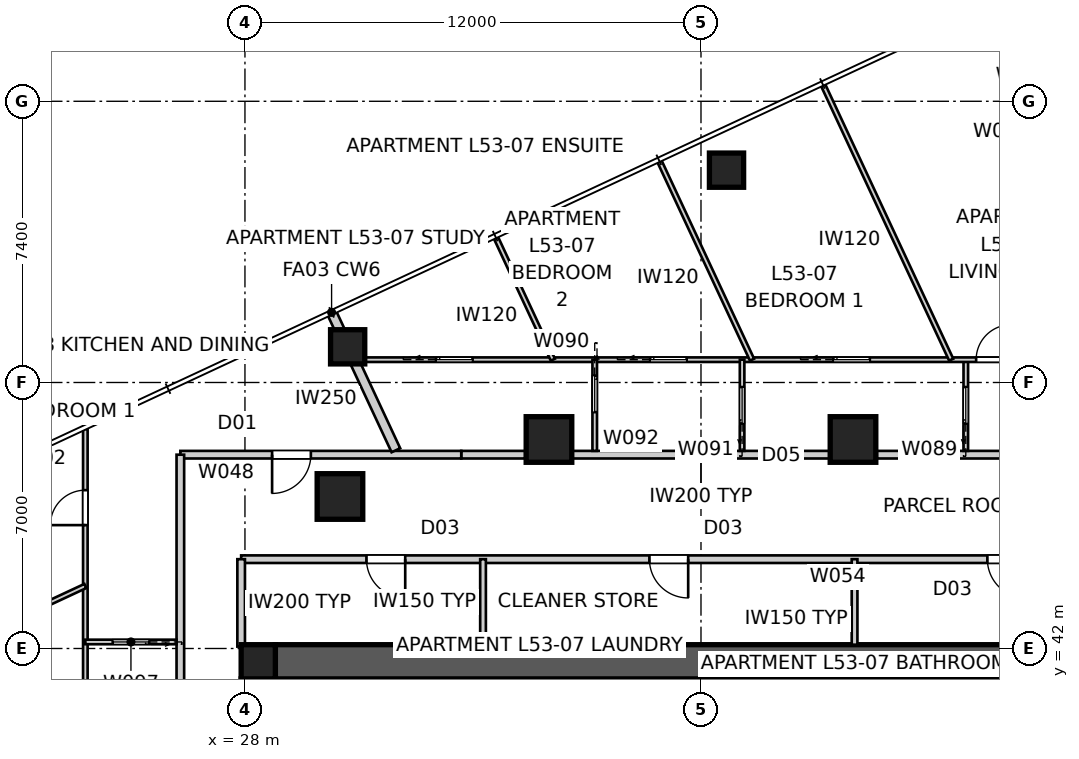
"""IFC4 building model, lengths in metres.
Left out: names, types, materials, properties, quantities, classifications, styles, units other than length and angle.
Written with IfcOpenShell. Run it as: python <this file> out.ifc"""

import sys

from ifc_helpers import new_model, si_unit, direction, frame, frame_2d, origin, origin_2d, place, context, subcontext, project, spatial, polyline, rectangle, outline, extrude, element, fill, save


model = new_model("IFC4")
c1 = context("Model", 3, precision=1e-05, world=origin(), true_north=direction((0.0, 1.0)))
c2 = subcontext(c1, "Body", "Model", "MODEL_VIEW")
j1 = project(units=[si_unit("LENGTHUNIT", "METRE"), si_unit("PLANEANGLEUNIT", "RADIAN")], contexts=[c1])
p1 = place(None, origin())
s1 = spatial("IfcSite", under=j1, at=p1, CompositionType="ELEMENT")
p2 = place(p1, origin())
s2 = spatial("IfcBuilding", under=s1, at=p2, CompositionType="ELEMENT")
p3 = place(p2, frame((0.0, 0.0, 193.0)))
s3 = spatial("IfcBuildingStorey", under=s2, at=p3, CompositionType="ELEMENT", Elevation=193.0)
p4 = place(p3, frame((28.8, 41.65, 0.0), z_axis=(0.0, 0.0, 1.0), x_axis=(1.0, 0.0, 0.0)))
e1 = element("IfcWall", 1, at=p4, inside=s3, PredefinedType="SHEAR", context=c2, shape_type="SweptSolid", body=[
    extrude(outline(polyline([(0.0, -0.45), (22.4, -0.45), (22.4, -0.025), (22.85, -0.025), (22.85, 0.025), (22.4, 0.025), (22.4, 0.45), (0.0, 0.45), (0.0, 0.025), (-0.45, 0.025), (-0.45, -0.025), (0.0, -0.025), (0.0, -0.45)])), origin(), (0.0, 0.0, 1.0), 3.4),
])
p5 = place(p3, frame((28.35, 41.2, 0.0), z_axis=(0.0, 0.0, 1.0), x_axis=(0.0, -1.0, 0.0)))
e2 = element("IfcWall", 2, at=p5, inside=s3, PredefinedType="SHEAR", context=c2, shape_type="SweptSolid", body=[
    extrude(outline(polyline([(0.0, -0.45), (22.4, -0.45), (22.4, -0.025), (22.85, -0.025), (22.85, 0.025), (22.4, 0.025), (22.4, 0.45), (0.0, 0.45), (0.0, 0.025), (-0.45, 0.025), (-0.45, -0.025), (0.0, -0.025), (0.0, -0.45)])), origin(), (0.0, 0.0, 1.0), 3.4),
])
p6 = place(p5, frame((11.14, 0.0, 0.0)))
e3 = element("IfcOpeningElement", 3, at=p6, cuts=e2, PredefinedType="OPENING", context=c2, shape_type="SweptSolid", body=[
    extrude(rectangle(XDim=1.02, YDim=2.4, at=frame_2d((0.51, 1.2))), frame((0.0, 0.46, 0.0), z_axis=(0.0, -1.0, 0.0), x_axis=(1.0, 0.0, 0.0)), (0.0, 0.0, 1.0), 0.92),
])
for number, where, z_axis, x_axis in (
    (4, (28.35, 41.65, 0.0), (0.0, 0.0, 1.0), (1.0, 0.0, 0.0)),
    (5, (40.672, 54.588, 0.0), (0.0, 0.0, 1.0), (1.0, 0.0, 0.0)),
    (6, (30.702, 49.939, 0.0), (0.0, 0.0, 1.0), (1.0, 0.0, 0.0)),
):
    element("IfcColumn", number, at=place(p3, frame(where, z_axis=z_axis, x_axis=x_axis)), inside=s3, PredefinedType="COLUMN", context=c2, shape_type="SweptSolid", body=[
        extrude(rectangle(XDim=0.9, YDim=0.9, at=origin_2d()), origin(), (0.0, 0.0, 1.0), 3.4),
    ])
for number, where, z_axis, x_axis in (
    (7, (44.0, 47.5, 0.0), (0.0, 0.0, 1.0), (1.0, 0.0, 0.0)),
    (8, (36.0, 47.5, 0.0), (0.0, 0.0, 1.0), (1.0, 0.0, 0.0)),
    (9, (30.5, 46.0, 0.0), (0.0, 0.0, 1.0), (1.0, 0.0, 0.0)),
):
    element("IfcColumn", number, at=place(p3, frame(where, z_axis=z_axis, x_axis=x_axis)), inside=s3, PredefinedType="COLUMN", context=c2, shape_type="SweptSolid", body=[
        extrude(rectangle(XDim=1.2, YDim=1.2, at=origin_2d()), origin(), (0.0, 0.0, 1.0), 3.4),
    ])
p7 = place(p3, frame((49.19, 55.25, 0.0), z_axis=(0.0, 0.0, 1.0), x_axis=(-0.422658246362, 0.906289140828, 0.0)))
e10 = element("IfcWall", 10, at=p7, inside=s3, PredefinedType="SOLIDWALL", context=c2, shape_type="SweptSolid", body=[
    extrude(rectangle(XDim=4.0, YDim=0.2, at=frame_2d((2.0, 0.0))), origin(), (0.0, 0.0, 1.0), 3.25),
])
p8 = place(p7, frame((1.0, 0.0, 0.45)))
e11 = element("IfcOpeningElement", 11, at=p8, cuts=e10, PredefinedType="OPENING", context=c2, shape_type="SweptSolid", body=[
    extrude(rectangle(XDim=2.0, YDim=1.8, at=frame_2d((1.0, 0.9))), frame((0.0, 0.11, 0.0), z_axis=(0.0, -1.0, 0.0), x_axis=(1.0, 0.0, 0.0)), (0.0, 0.0, 1.0), 0.22),
])
p9 = place(p3, frame((53.7, 47.1, 0.0), z_axis=(0.0, 0.0, 1.0), x_axis=(-1.0, 0.0, 0.0)))
e12 = element("IfcWall", 12, at=p9, inside=s3, PredefinedType="PARTITIONING", context=c2, shape_type="SweptSolid", body=[
    extrude(rectangle(XDim=7.392, YDim=0.2, at=frame_2d((3.696, 0.0))), origin(), (0.0, 0.0, 1.0), 3.25),
])
p10 = place(p9, frame((2.431, 0.0, 0.0)))
e13 = element("IfcOpeningElement", 13, at=p10, cuts=e12, PredefinedType="OPENING", context=c2, shape_type="SweptSolid", body=[
    extrude(rectangle(XDim=1.02, YDim=2.34, at=frame_2d((0.51, 1.17))), frame((0.0, 0.11, 0.0), z_axis=(0.0, -1.0, 0.0), x_axis=(1.0, 0.0, 0.0)), (0.0, 0.0, 1.0), 0.22),
])
p11 = place(p3, frame((46.308, 47.1, 0.0), z_axis=(0.0, 0.0, 1.0), x_axis=(-1.0, 0.0, 0.0)))
e14 = element("IfcWall", 14, at=p11, inside=s3, PredefinedType="PARTITIONING", context=c2, shape_type="SweptSolid", body=[
    extrude(rectangle(XDim=1.683, YDim=0.2, at=frame_2d((0.842, 0.0))), origin(), (0.0, 0.0, 1.0), 2.55),
])
p12 = place(p3, frame((44.625, 47.1, 0.0), z_axis=(0.0, 0.0, 1.0), x_axis=(-1.0, 0.0, 0.0)))
e15 = element("IfcWall", 15, at=p12, inside=s3, PredefinedType="PARTITIONING", context=c2, shape_type="SweptSolid", body=[
    extrude(rectangle(XDim=9.25, YDim=0.2, at=frame_2d((4.625, 0.0))), origin(), (0.0, 0.0, 1.0), 3.25),
])
p13 = place(p3, frame((35.375, 47.1, 0.0), z_axis=(0.0, 0.0, 1.0), x_axis=(-1.0, 0.0, 0.0)))
e16 = element("IfcWall", 16, at=p13, inside=s3, PredefinedType="PARTITIONING", context=c2, shape_type="SweptSolid", body=[
    extrude(rectangle(XDim=1.683, YDim=0.2, at=frame_2d((0.842, 0.0))), origin(), (0.0, 0.0, 1.0), 2.55),
])
p14 = place(p3, frame((33.692, 47.1, 0.0), z_axis=(0.0, 0.0, 1.0), x_axis=(-1.0, 0.0, 0.0)))
e17 = element("IfcWall", 17, at=p14, inside=s3, PredefinedType="PARTITIONING", context=c2, shape_type="SweptSolid", body=[
    extrude(rectangle(XDim=7.392, YDim=0.2, at=frame_2d((3.696, 0.0))), origin(), (0.0, 0.0, 1.0), 3.25),
])
p15 = place(p14, frame((3.957, 0.0, 0.0)))
e18 = element("IfcOpeningElement", 18, at=p15, cuts=e17, PredefinedType="OPENING", context=c2, shape_type="SweptSolid", body=[
    extrude(rectangle(XDim=1.02, YDim=2.34, at=frame_2d((0.51, 1.17))), frame((0.0, 0.11, 0.0), z_axis=(0.0, -1.0, 0.0), x_axis=(1.0, 0.0, 0.0)), (0.0, 0.0, 1.0), 0.22),
])
p16 = place(p3, frame((26.3, 47.1, 0.0), z_axis=(0.0, 0.0, 1.0), x_axis=(0.0, -1.0, 0.0)))
e19 = element("IfcWall", 19, at=p16, inside=s3, PredefinedType="PARTITIONING", context=c2, shape_type="SweptSolid", body=[
    extrude(rectangle(XDim=33.8, YDim=0.2, at=frame_2d((16.9, 0.0))), origin(), (0.0, 0.0, 1.0), 3.25),
])
p17 = place(p16, frame((15.449, 0.0, 0.0)))
e20 = element("IfcOpeningElement", 20, at=p17, cuts=e19, PredefinedType="OPENING", context=c2, shape_type="SweptSolid", body=[
    extrude(rectangle(XDim=1.02, YDim=2.34, at=frame_2d((0.51, 1.17))), frame((0.0, 0.11, 0.0), z_axis=(0.0, -1.0, 0.0), x_axis=(1.0, 0.0, 0.0)), (0.0, 0.0, 1.0), 0.22),
])
p18 = place(p16, frame((30.883, 0.0, 0.0)))
e21 = element("IfcOpeningElement", 21, at=p18, cuts=e19, PredefinedType="OPENING", context=c2, shape_type="SweptSolid", body=[
    extrude(rectangle(XDim=1.02, YDim=2.34, at=frame_2d((0.51, 1.17))), frame((0.0, 0.11, 0.0), z_axis=(0.0, -1.0, 0.0), x_axis=(1.0, 0.0, 0.0)), (0.0, 0.0, 1.0), 0.22),
])
p19 = place(p3, frame((30.28, 50.845, 0.0), z_axis=(0.0, 0.0, 1.0), x_axis=(0.422605017068, -0.906313963011, 0.0)))
e22 = element("IfcWall", 22, at=p19, inside=s3, PredefinedType="PARTITIONING", context=c2, shape_type="SweptSolid", body=[
    extrude(rectangle(XDim=4.003, YDim=0.25, at=frame_2d((2.002, 0.0))), origin(), (0.0, 0.0, 1.0), 3.25),
])
p20 = place(p3, frame((52.1, 44.35, 0.0), z_axis=(0.0, 0.0, 1.0), x_axis=(-1.0, 0.0, 0.0)))
e23 = element("IfcWall", 23, at=p20, inside=s3, PredefinedType="PARTITIONING", context=c2, shape_type="SweptSolid", body=[
    extrude(rectangle(XDim=24.2, YDim=0.2, at=frame_2d((12.1, 0.0))), origin(), (0.0, 0.0, 1.0), 3.25),
])
p21 = place(p20, frame((12.437, 0.0, 0.0)))
e24 = element("IfcOpeningElement", 24, at=p21, cuts=e23, PredefinedType="OPENING", context=c2, shape_type="SweptSolid", body=[
    extrude(rectangle(XDim=1.02, YDim=2.1, at=frame_2d((0.51, 1.05))), frame((0.0, 0.11, 0.0), z_axis=(0.0, -1.0, 0.0), x_axis=(1.0, 0.0, 0.0)), (0.0, 0.0, 1.0), 0.22),
])
p22 = place(p20, frame((3.544, 0.0, 0.0)))
e25 = element("IfcOpeningElement", 25, at=p22, cuts=e23, PredefinedType="OPENING", context=c2, shape_type="SweptSolid", body=[
    extrude(rectangle(XDim=1.02, YDim=2.1, at=frame_2d((0.51, 1.05))), frame((0.0, 0.11, 0.0), z_axis=(0.0, -1.0, 0.0), x_axis=(1.0, 0.0, 0.0)), (0.0, 0.0, 1.0), 0.22),
])
p23 = place(p20, frame((19.883, 0.0, 0.0)))
e26 = element("IfcOpeningElement", 26, at=p23, cuts=e23, PredefinedType="OPENING", context=c2, shape_type="SweptSolid", body=[
    extrude(rectangle(XDim=1.02, YDim=2.1, at=frame_2d((0.51, 1.05))), frame((0.0, 0.11, 0.0), z_axis=(0.0, -1.0, 0.0), x_axis=(1.0, 0.0, 0.0)), (0.0, 0.0, 1.0), 0.22),
])
p24 = place(p3, frame((27.9, 44.35, 0.0), z_axis=(0.0, 0.0, 1.0), x_axis=(0.0, -1.0, 0.0)))
e27 = element("IfcWall", 27, at=p24, inside=s3, PredefinedType="PARTITIONING", context=c2, shape_type="SweptSolid", body=[
    extrude(rectangle(XDim=2.3, YDim=0.2, at=frame_2d((1.15, 0.0))), origin(), (0.0, 0.0, 1.0), 3.25),
])
p25 = place(p3, frame((34.265, 42.1, 0.0), z_axis=(0.0, 0.0, 1.0), x_axis=(0.0, 1.0, 0.0)))
e28 = element("IfcWall", 28, at=p25, inside=s3, PredefinedType="SOLIDWALL", context=c2, shape_type="SweptSolid", body=[
    extrude(rectangle(XDim=2.25, YDim=0.15, at=frame_2d((1.125, 0.0))), origin(), (0.0, 0.0, 1.0), 2.796),
])
p26 = place(p3, frame((44.042, 42.1, 0.0), z_axis=(0.0, 0.0, 1.0), x_axis=(0.0, 1.0, 0.0)))
e29 = element("IfcWall", 29, at=p26, inside=s3, PredefinedType="SOLIDWALL", context=c2, shape_type="SweptSolid", body=[
    extrude(rectangle(XDim=2.25, YDim=0.15, at=frame_2d((1.125, 0.0))), origin(), (0.0, 0.0, 1.0), 3.25),
])
p27 = place(p3, frame((23.8, 17.205, 0.0), z_axis=(0.0, 0.0, 1.0), x_axis=(0.0, 1.0, 0.0)))
e30 = element("IfcWall", 30, at=p27, inside=s3, PredefinedType="PARTITIONING", context=c2, shape_type="SweptSolid", body=[
    extrude(rectangle(XDim=30.574, YDim=0.12, at=frame_2d((15.287, 0.0))), origin(), (0.0, 0.0, 1.0), 2.55),
])
p28 = place(p27, frame((12.857, 0.0, 0.0)))
e31 = element("IfcOpeningElement", 31, at=p28, cuts=e30, PredefinedType="OPENING", context=c2, shape_type="SweptSolid", body=[
    extrude(rectangle(XDim=0.92, YDim=2.34, at=frame_2d((0.46, 1.17))), frame((0.0, 0.07, 0.0), z_axis=(0.0, -1.0, 0.0), x_axis=(1.0, 0.0, 0.0)), (0.0, 0.0, 1.0), 0.14),
])
p29 = place(p27, frame((28.042, 0.0, 0.0)))
e32 = element("IfcOpeningElement", 32, at=p29, cuts=e30, PredefinedType="OPENING", context=c2, shape_type="SweptSolid", body=[
    extrude(rectangle(XDim=0.92, YDim=2.34, at=frame_2d((0.46, 1.17))), frame((0.0, 0.07, 0.0), z_axis=(0.0, -1.0, 0.0), x_axis=(1.0, 0.0, 0.0)), (0.0, 0.0, 1.0), 0.14),
])
p30 = place(p27, frame((20.655, 0.0, 0.0)))
e33 = element("IfcOpeningElement", 33, at=p30, cuts=e30, PredefinedType="OPENING", context=c2, shape_type="SweptSolid", body=[
    extrude(rectangle(XDim=0.96, YDim=2.1, at=frame_2d((0.48, 1.05))), frame((0.0, 0.07, 0.0), z_axis=(0.0, -1.0, 0.0), x_axis=(1.0, 0.0, 0.0)), (0.0, 0.0, 1.0), 0.14),
])
p31 = place(p3, frame((46.968, 47.2, 0.0), z_axis=(0.0, 0.0, 1.0), x_axis=(0.0, 1.0, 0.0)))
e34 = element("IfcWall", 34, at=p31, inside=s3, PredefinedType="PARTITIONING", context=c2, shape_type="SweptSolid", body=[
    extrude(rectangle(XDim=2.4, YDim=0.12, at=frame_2d((1.2, 0.0))), origin(), (0.0, 0.0, 1.0), 3.25),
])
p32 = place(p31, frame((0.72, 0.0, 0.0)))
e35 = element("IfcOpeningElement", 35, at=p32, cuts=e34, PredefinedType="OPENING", context=c2, shape_type="SweptSolid", body=[
    extrude(rectangle(XDim=0.96, YDim=2.1, at=frame_2d((0.48, 1.05))), frame((0.0, 0.07, 0.0), z_axis=(0.0, -1.0, 0.0), x_axis=(1.0, 0.0, 0.0)), (0.0, 0.0, 1.0), 0.14),
])
p33 = place(p3, frame((30.86, 49.6, 0.0), z_axis=(0.0, 0.0, 1.0), x_axis=(1.0, 0.0, 0.0)))
e36 = element("IfcWall", 36, at=p33, inside=s3, PredefinedType="PARTITIONING", context=c2, shape_type="SweptSolid", body=[
    extrude(rectangle(XDim=25.333, YDim=0.12, at=frame_2d((12.667, 0.0))), origin(), (0.0, 0.0, 1.0), 3.25),
])
p34 = place(p33, frame((20.877, 0.0, 0.0)))
e37 = element("IfcOpeningElement", 37, at=p34, cuts=e36, PredefinedType="OPENING", context=c2, shape_type="SweptSolid", body=[
    extrude(rectangle(XDim=0.92, YDim=2.34, at=frame_2d((0.46, 1.17))), frame((0.0, 0.07, 0.0), z_axis=(0.0, -1.0, 0.0), x_axis=(1.0, 0.0, 0.0)), (0.0, 0.0, 1.0), 0.14),
])
p35 = place(p33, frame((16.38, 0.0, 0.0)))
e38 = element("IfcOpeningElement", 38, at=p35, cuts=e36, PredefinedType="OPENING", context=c2, shape_type="SweptSolid", body=[
    extrude(rectangle(XDim=0.92, YDim=2.34, at=frame_2d((0.46, 1.17))), frame((0.0, 0.07, 0.0), z_axis=(0.0, -1.0, 0.0), x_axis=(1.0, 0.0, 0.0)), (0.0, 0.0, 1.0), 0.14),
])
p36 = place(p33, frame((12.623, 0.0, 0.0)))
e39 = element("IfcOpeningElement", 39, at=p36, cuts=e36, PredefinedType="OPENING", context=c2, shape_type="SweptSolid", body=[
    extrude(rectangle(XDim=0.96, YDim=2.1, at=frame_2d((0.48, 1.05))), frame((0.0, 0.07, 0.0), z_axis=(0.0, -1.0, 0.0), x_axis=(1.0, 0.0, 0.0)), (0.0, 0.0, 1.0), 0.14),
])
p37 = place(p33, frame((7.802, 0.0, 0.0)))
e40 = element("IfcOpeningElement", 40, at=p37, cuts=e36, PredefinedType="OPENING", context=c2, shape_type="SweptSolid", body=[
    extrude(rectangle(XDim=0.96, YDim=2.1, at=frame_2d((0.48, 1.05))), frame((0.0, 0.07, 0.0), z_axis=(0.0, -1.0, 0.0), x_axis=(1.0, 0.0, 0.0)), (0.0, 0.0, 1.0), 0.14),
])
p38 = place(p33, frame((2.168, 0.0, 0.0)))
e41 = element("IfcOpeningElement", 41, at=p38, cuts=e36, PredefinedType="OPENING", context=c2, shape_type="SweptSolid", body=[
    extrude(rectangle(XDim=0.96, YDim=2.1, at=frame_2d((0.48, 1.05))), frame((0.0, 0.07, 0.0), z_axis=(0.0, -1.0, 0.0), x_axis=(1.0, 0.0, 0.0)), (0.0, 0.0, 1.0), 0.14),
])
p39 = place(p3, frame((41.082, 47.2, 0.0), z_axis=(0.0, 0.0, 1.0), x_axis=(0.0, 1.0, 0.0)))
e42 = element("IfcWall", 42, at=p39, inside=s3, PredefinedType="PARTITIONING", context=c2, shape_type="SweptSolid", body=[
    extrude(rectangle(XDim=2.4, YDim=0.12, at=frame_2d((1.2, 0.0))), origin(), (0.0, 0.0, 1.0), 3.25),
])
p40 = place(p39, frame((0.72, 0.0, 0.0)))
e43 = element("IfcOpeningElement", 43, at=p40, cuts=e42, PredefinedType="OPENING", context=c2, shape_type="SweptSolid", body=[
    extrude(rectangle(XDim=0.96, YDim=2.1, at=frame_2d((0.48, 1.05))), frame((0.0, 0.07, 0.0), z_axis=(0.0, -1.0, 0.0), x_axis=(1.0, 0.0, 0.0)), (0.0, 0.0, 1.0), 0.14),
])
p41 = place(p3, frame((37.204, 49.6, 0.0), z_axis=(0.0, 0.0, 1.0), x_axis=(0.0, -1.0, 0.0)))
e44 = element("IfcWall", 44, at=p41, inside=s3, PredefinedType="PARTITIONING", context=c2, shape_type="SweptSolid", body=[
    extrude(rectangle(XDim=2.4, YDim=0.12, at=frame_2d((1.2, 0.0))), origin(), (0.0, 0.0, 1.0), 3.25),
])
p42 = place(p41, frame((0.42, 0.0, 0.0)))
e45 = element("IfcOpeningElement", 45, at=p42, cuts=e44, PredefinedType="OPENING", context=c2, shape_type="SweptSolid", body=[
    extrude(rectangle(XDim=0.96, YDim=2.1, at=frame_2d((0.48, 1.05))), frame((0.0, 0.07, 0.0), z_axis=(0.0, -1.0, 0.0), x_axis=(1.0, 0.0, 0.0)), (0.0, 0.0, 1.0), 0.14),
])
p43 = place(p3, frame((46.583, 49.6, 0.0), z_axis=(0.0, 0.0, 1.0), x_axis=(-0.422640876946, 0.90629724105, 0.0)))
e46 = element("IfcWall", 46, at=p43, inside=s3, PredefinedType="PARTITIONING", context=c2, shape_type="SweptSolid", body=[
    extrude(rectangle(XDim=7.979, YDim=0.12, at=frame_2d((3.989, 0.0))), origin(), (0.0, 0.0, 1.0), 3.25),
])
p44 = place(p3, frame((41.343, 49.6, 0.0), z_axis=(0.0, 0.0, 1.0), x_axis=(-0.422648925879, 0.906293487483, 0.0)))
e47 = element("IfcWall", 47, at=p44, inside=s3, PredefinedType="PARTITIONING", context=c2, shape_type="SweptSolid", body=[
    extrude(rectangle(XDim=5.764, YDim=0.12, at=frame_2d((2.882, 0.0))), origin(), (0.0, 0.0, 1.0), 3.25),
])
p45 = place(p3, frame((36.101, 49.6, 0.0), z_axis=(0.0, 0.0, 1.0), x_axis=(-0.42263686638, 0.906299111318, 0.0)))
e48 = element("IfcWall", 48, at=p45, inside=s3, PredefinedType="PARTITIONING", context=c2, shape_type="SweptSolid", body=[
    extrude(rectangle(XDim=3.549, YDim=0.12, at=frame_2d((1.774, 0.0))), origin(), (0.0, 0.0, 1.0), 3.25),
])
p46 = place(p3, frame((26.2, 42.172, 0.0), z_axis=(0.0, 0.0, 1.0), x_axis=(-1.0, 0.0, 0.0)))
e49 = element("IfcWall", 49, at=p46, inside=s3, PredefinedType="PARTITIONING", context=c2, shape_type="SweptSolid", body=[
    extrude(rectangle(XDim=2.4, YDim=0.12, at=frame_2d((1.2, 0.0))), origin(), (0.0, 0.0, 1.0), 3.25),
])
p47 = place(p46, frame((0.72, 0.0, 0.0)))
e50 = element("IfcOpeningElement", 50, at=p47, cuts=e49, PredefinedType="OPENING", context=c2, shape_type="SweptSolid", body=[
    extrude(rectangle(XDim=0.96, YDim=2.1, at=frame_2d((0.48, 1.05))), frame((0.0, 0.07, 0.0), z_axis=(0.0, -1.0, 0.0), x_axis=(1.0, 0.0, 0.0)), (0.0, 0.0, 1.0), 0.14),
])
p48 = place(p3, frame((18.965, 41.391, 0.0), z_axis=(0.0, 0.0, 1.0), x_axis=(0.906312880264, 0.422607339108, 0.0)))
e51 = element("IfcWall", 51, at=p48, inside=s3, PredefinedType="PARTITIONING", context=c2, shape_type="SweptSolid", body=[
    extrude(rectangle(XDim=5.334, YDim=0.12, at=frame_2d((2.667, 0.0))), origin(), (0.0, 0.0, 1.0), 3.25),
])
p49 = place(p21, origin())
e52 = element("IfcDoor", 52, at=p49, inside=s3, OperationType="SINGLE_SWING_LEFT", PredefinedType="DOOR", context=c2, shape_type="SweptSolid", body=[
    extrude(rectangle(XDim=1.02, YDim=2.1, at=frame_2d((0.51, 1.05))), frame((0.0, 0.025, 0.0), z_axis=(0.0, -1.0, 0.0), x_axis=(1.0, 0.0, 0.0)), (0.0, 0.0, 1.0), 0.05),
])
fill(e24, e52)
p50 = place(p22, origin())
e53 = element("IfcDoor", 53, at=p50, inside=s3, OperationType="SINGLE_SWING_LEFT", PredefinedType="DOOR", context=c2, shape_type="SweptSolid", body=[
    extrude(rectangle(XDim=1.02, YDim=2.1, at=frame_2d((0.51, 1.05))), frame((0.0, 0.025, 0.0), z_axis=(0.0, -1.0, 0.0), x_axis=(1.0, 0.0, 0.0)), (0.0, 0.0, 1.0), 0.05),
])
fill(e25, e53)
p51 = place(p23, origin())
e54 = element("IfcDoor", 54, at=p51, inside=s3, OperationType="SINGLE_SWING_LEFT", PredefinedType="DOOR", context=c2, shape_type="SweptSolid", body=[
    extrude(rectangle(XDim=1.02, YDim=2.1, at=frame_2d((0.51, 1.05))), frame((0.0, 0.025, 0.0), z_axis=(0.0, -1.0, 0.0), x_axis=(1.0, 0.0, 0.0)), (0.0, 0.0, 1.0), 0.05),
])
fill(e26, e54)
p52 = place(p15, origin())
e55 = element("IfcDoor", 55, at=p52, inside=s3, OperationType="SINGLE_SWING_RIGHT", PredefinedType="DOOR", context=c2, shape_type="SweptSolid", body=[
    extrude(rectangle(XDim=1.02, YDim=2.34, at=frame_2d((0.51, 1.17))), frame((0.0, 0.025, 0.0), z_axis=(0.0, -1.0, 0.0), x_axis=(1.0, 0.0, 0.0)), (0.0, 0.0, 1.0), 0.05),
])
fill(e18, e55)
p53 = place(p32, origin())
e56 = element("IfcDoor", 56, at=p53, inside=s3, OperationType="SLIDING_TO_LEFT", PredefinedType="DOOR", context=c2, shape_type="SweptSolid", body=[
    extrude(rectangle(XDim=0.96, YDim=2.1, at=frame_2d((0.48, 1.05))), frame((0.0, 0.025, 0.0), z_axis=(0.0, -1.0, 0.0), x_axis=(1.0, 0.0, 0.0)), (0.0, 0.0, 1.0), 0.05),
])
fill(e35, e56)
p54 = place(p35, origin())
e57 = element("IfcDoor", 57, at=p54, inside=s3, OperationType="SINGLE_SWING_RIGHT", PredefinedType="DOOR", context=c2, shape_type="SweptSolid", body=[
    extrude(rectangle(XDim=0.92, YDim=2.34, at=frame_2d((0.46, 1.17))), frame((0.0, 0.025, 0.0), z_axis=(0.0, -1.0, 0.0), x_axis=(1.0, 0.0, 0.0)), (0.0, 0.0, 1.0), 0.05),
])
fill(e38, e57)
p55 = place(p29, origin())
e58 = element("IfcDoor", 58, at=p55, inside=s3, OperationType="SINGLE_SWING_LEFT", PredefinedType="DOOR", context=c2, shape_type="SweptSolid", body=[
    extrude(rectangle(XDim=0.92, YDim=2.34, at=frame_2d((0.46, 1.17))), frame((0.0, 0.025, 0.0), z_axis=(0.0, -1.0, 0.0), x_axis=(1.0, 0.0, 0.0)), (0.0, 0.0, 1.0), 0.05),
])
fill(e32, e58)
p56 = place(p47, origin())
e59 = element("IfcDoor", 59, at=p56, inside=s3, OperationType="SLIDING_TO_LEFT", PredefinedType="DOOR", context=c2, shape_type="SweptSolid", body=[
    extrude(rectangle(XDim=0.96, YDim=2.1, at=frame_2d((0.48, 1.05))), frame((0.0, 0.025, 0.0), z_axis=(0.0, -1.0, 0.0), x_axis=(1.0, 0.0, 0.0)), (0.0, 0.0, 1.0), 0.05),
])
fill(e50, e59)
p57 = place(p36, origin())
e60 = element("IfcDoor", 60, at=p57, inside=s3, OperationType="SLIDING_TO_LEFT", PredefinedType="DOOR", context=c2, shape_type="SweptSolid", body=[
    extrude(rectangle(XDim=0.96, YDim=2.1, at=frame_2d((0.48, 1.05))), frame((0.0, 0.025, 0.0), z_axis=(0.0, -1.0, 0.0), x_axis=(1.0, 0.0, 0.0)), (0.0, 0.0, 1.0), 0.05),
])
fill(e39, e60)
p58 = place(p40, origin())
e61 = element("IfcDoor", 61, at=p58, inside=s3, OperationType="SLIDING_TO_LEFT", PredefinedType="DOOR", context=c2, shape_type="SweptSolid", body=[
    extrude(rectangle(XDim=0.96, YDim=2.1, at=frame_2d((0.48, 1.05))), frame((0.0, 0.025, 0.0), z_axis=(0.0, -1.0, 0.0), x_axis=(1.0, 0.0, 0.0)), (0.0, 0.0, 1.0), 0.05),
])
fill(e43, e61)
p59 = place(p37, origin())
e62 = element("IfcDoor", 62, at=p59, inside=s3, OperationType="SLIDING_TO_LEFT", PredefinedType="DOOR", context=c2, shape_type="SweptSolid", body=[
    extrude(rectangle(XDim=0.96, YDim=2.1, at=frame_2d((0.48, 1.05))), frame((0.0, 0.025, 0.0), z_axis=(0.0, -1.0, 0.0), x_axis=(1.0, 0.0, 0.0)), (0.0, 0.0, 1.0), 0.05),
])
fill(e40, e62)
p60 = place(p42, origin())
e63 = element("IfcDoor", 63, at=p60, inside=s3, OperationType="SLIDING_TO_LEFT", PredefinedType="DOOR", context=c2, shape_type="SweptSolid", body=[
    extrude(rectangle(XDim=0.96, YDim=2.1, at=frame_2d((0.48, 1.05))), frame((0.0, 0.025, 0.0), z_axis=(0.0, -1.0, 0.0), x_axis=(1.0, 0.0, 0.0)), (0.0, 0.0, 1.0), 0.05),
])
fill(e45, e63)
p61 = place(p38, origin())
e64 = element("IfcDoor", 64, at=p61, inside=s3, OperationType="SLIDING_TO_LEFT", PredefinedType="DOOR", context=c2, shape_type="SweptSolid", body=[
    extrude(rectangle(XDim=0.96, YDim=2.1, at=frame_2d((0.48, 1.05))), frame((0.0, 0.025, 0.0), z_axis=(0.0, -1.0, 0.0), x_axis=(1.0, 0.0, 0.0)), (0.0, 0.0, 1.0), 0.05),
])
fill(e41, e64)
save(model, sys.argv[1])
